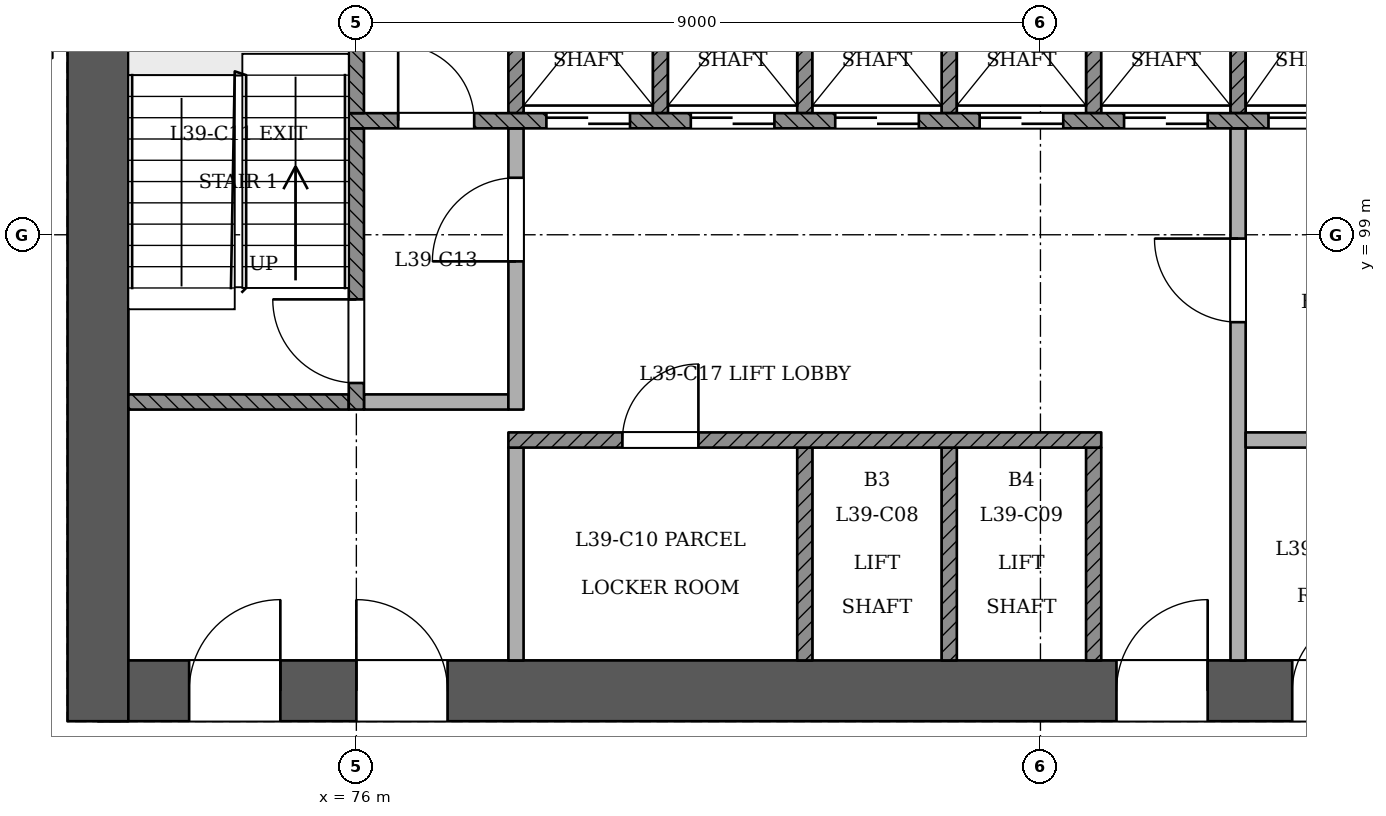
"""IFC4 building model, lengths in metres.
Left out: names, types, materials, properties, quantities, classifications, styles, units other than length and angle.
Written with IfcOpenShell. Run it as: python <this file> out.ifc"""

import sys

from ifc_helpers import new_model, si_unit, direction, frame, frame_2d, origin, place, context, subcontext, project, spatial, rectangle, extrude, element, fill, save


model = new_model("IFC4")
c1 = context("Model", 3, precision=1e-05, world=origin(), true_north=direction((0.0, 1.0)))
c2 = subcontext(c1, "Body", "Model", "MODEL_VIEW")
j1 = project(units=[si_unit("LENGTHUNIT", "METRE"), si_unit("PLANEANGLEUNIT", "RADIAN")], contexts=[c1])
p1 = place(None, origin())
s1 = spatial("IfcSite", under=j1, at=p1, CompositionType="ELEMENT")
p2 = place(p1, origin())
s2 = spatial("IfcBuilding", under=s1, at=p2, CompositionType="ELEMENT")
p3 = place(p2, frame((0.0, 0.0, 153.0)))
s3 = spatial("IfcBuildingStorey", under=s2, at=p3, CompositionType="ELEMENT", Elevation=153.0)
p4 = place(p3, frame((72.6, 93.0, 0.0), z_axis=(0.0, 0.0, 1.0), x_axis=(1.0, 0.0, 0.0)))
e1 = element("IfcWall", 1, at=p4, inside=s3, PredefinedType="SHEAR", context=c2, shape_type="SweptSolid", body=[
    extrude(rectangle(XDim=25.2, YDim=0.8, at=frame_2d((12.6, 0.0))), origin(), (0.0, 0.0, 1.0), 3.6),
])
p5 = place(p4, frame((1.2, 0.0, 0.0)))
e2 = element("IfcOpeningElement", 2, at=p5, cuts=e1, PredefinedType="OPENING", context=c2, shape_type="SweptSolid", body=[
    extrude(rectangle(XDim=1.2, YDim=2.1, at=frame_2d((0.6, 1.05))), frame((0.0, 0.411, 0.0), z_axis=(0.0, -1.0, 0.0), x_axis=(1.0, 0.0, 0.0)), (0.0, 0.0, 1.0), 0.821),
])
p6 = place(p4, frame((3.4, 0.0, 0.0)))
e3 = element("IfcOpeningElement", 3, at=p6, cuts=e1, PredefinedType="OPENING", context=c2, shape_type="SweptSolid", body=[
    extrude(rectangle(XDim=1.2, YDim=2.1, at=frame_2d((0.6, 1.05))), frame((0.0, 0.411, 0.0), z_axis=(0.0, -1.0, 0.0), x_axis=(1.0, 0.0, 0.0)), (0.0, 0.0, 1.0), 0.821),
])
p7 = place(p4, frame((13.4, 0.0, 0.0)))
e4 = element("IfcOpeningElement", 4, at=p7, cuts=e1, PredefinedType="OPENING", context=c2, shape_type="SweptSolid", body=[
    extrude(rectangle(XDim=1.2, YDim=2.1, at=frame_2d((0.6, 1.05))), frame((0.0, 0.411, 0.0), z_axis=(0.0, -1.0, 0.0), x_axis=(1.0, 0.0, 0.0)), (0.0, 0.0, 1.0), 0.821),
])
p8 = place(p4, frame((15.712, 0.0, 0.0)))
e5 = element("IfcOpeningElement", 5, at=p8, cuts=e1, PredefinedType="OPENING", context=c2, shape_type="SweptSolid", body=[
    extrude(rectangle(XDim=1.0, YDim=2.1, at=frame_2d((0.5, 1.05))), frame((0.0, 0.411, 0.0), z_axis=(0.0, -1.0, 0.0), x_axis=(1.0, 0.0, 0.0)), (0.0, 0.0, 1.0), 0.821),
])
p9 = place(p4, frame((19.15, 0.0, 0.0)))
e6 = element("IfcOpeningElement", 6, at=p9, cuts=e1, PredefinedType="OPENING", context=c2, shape_type="SweptSolid", body=[
    extrude(rectangle(XDim=1.0, YDim=2.1, at=frame_2d((0.5, 1.05))), frame((0.0, 0.411, 0.0), z_axis=(0.0, -1.0, 0.0), x_axis=(1.0, 0.0, 0.0)), (0.0, 0.0, 1.0), 0.821),
])
p10 = place(p4, frame((22.688, 0.0, 0.0)))
e7 = element("IfcOpeningElement", 7, at=p10, cuts=e1, PredefinedType="OPENING", context=c2, shape_type="SweptSolid", body=[
    extrude(rectangle(XDim=1.0, YDim=2.1, at=frame_2d((0.5, 1.05))), frame((0.0, 0.411, 0.0), z_axis=(0.0, -1.0, 0.0), x_axis=(1.0, 0.0, 0.0)), (0.0, 0.0, 1.0), 0.821),
])
p11 = place(p3, frame((72.6, 103.8, 0.0), z_axis=(0.0, 0.0, 1.0), x_axis=(0.0, -1.0, 0.0)))
e8 = element("IfcWall", 8, at=p11, inside=s3, PredefinedType="SHEAR", context=c2, shape_type="SweptSolid", body=[
    extrude(rectangle(XDim=11.2, YDim=0.8, at=frame_2d((5.6, 0.0))), origin(), (0.0, 0.0, 1.0), 3.6),
])
p12 = place(p3, frame((66.242, 97.188, 0.0), z_axis=(0.0, 0.0, 1.0), x_axis=(0.500002614046, -0.866023894559, 0.0)))
e9 = element("IfcWall", 9, at=p12, inside=s3, PredefinedType="PARTITIONING", context=c2, shape_type="SweptSolid", body=[
    extrude(rectangle(XDim=37.515, YDim=0.15, at=frame_2d((18.758, 0.0))), origin(), (0.0, 0.0, 1.0), 2.75),
])
p13 = place(p12, frame((2.8, 0.0, 0.0)))
e10 = element("IfcOpeningElement", 10, at=p13, cuts=e9, PredefinedType="OPENING", context=c2, shape_type="SweptSolid", body=[
    extrude(rectangle(XDim=1.2, YDim=2.1, at=frame_2d((0.6, 1.05))), frame((0.0, 0.085, 0.0), z_axis=(0.0, -1.0, 0.0), x_axis=(1.0, 0.0, 0.0)), (0.0, 0.0, 1.0), 0.171),
])
p14 = place(p12, frame((11.8, 0.0, 0.0)))
e11 = element("IfcOpeningElement", 11, at=p14, cuts=e9, PredefinedType="OPENING", context=c2, shape_type="SweptSolid", body=[
    extrude(rectangle(XDim=1.2, YDim=2.1, at=frame_2d((0.6, 1.05))), frame((0.0, 0.085, 0.0), z_axis=(0.0, -1.0, 0.0), x_axis=(1.0, 0.0, 0.0)), (0.0, 0.0, 1.0), 0.171),
])
p15 = place(p12, frame((24.15, 0.0, 0.0)))
e12 = element("IfcOpeningElement", 12, at=p15, cuts=e9, PredefinedType="OPENING", context=c2, shape_type="SweptSolid", body=[
    extrude(rectangle(XDim=1.2, YDim=2.1, at=frame_2d((0.6, 1.05))), frame((0.0, 0.085, 0.0), z_axis=(0.0, -1.0, 0.0), x_axis=(1.0, 0.0, 0.0)), (0.0, 0.0, 1.0), 0.171),
])
p16 = place(p12, frame((33.25, 0.0, 0.0)))
e13 = element("IfcOpeningElement", 13, at=p16, cuts=e9, PredefinedType="OPENING", context=c2, shape_type="SweptSolid", body=[
    extrude(rectangle(XDim=1.0, YDim=2.1, at=frame_2d((0.5, 1.05))), frame((0.0, 0.085, 0.0), z_axis=(0.0, -1.0, 0.0), x_axis=(1.0, 0.0, 0.0)), (0.0, 0.0, 1.0), 0.171),
])
p17 = place(p3, frame((85.065, 64.811, 0.0), z_axis=(0.0, 0.0, 1.0), x_axis=(0.500003399299, 0.866023441189, 0.0)))
e14 = element("IfcWall", 14, at=p17, inside=s3, PredefinedType="PARTITIONING", context=c2, shape_type="SweptSolid", body=[
    extrude(rectangle(XDim=37.385, YDim=0.15, at=frame_2d((18.693, 0.0))), origin(), (0.0, 0.0, 1.0), 2.75),
])
p18 = place(p17, frame((0.524, 0.0, 0.0)))
e15 = element("IfcOpeningElement", 15, at=p18, cuts=e14, PredefinedType="OPENING", context=c2, shape_type="SweptSolid", body=[
    extrude(rectangle(XDim=1.2, YDim=2.1, at=frame_2d((0.6, 1.05))), frame((0.0, 0.085, 0.0), z_axis=(0.0, -1.0, 0.0), x_axis=(1.0, 0.0, 0.0)), (0.0, 0.0, 1.0), 0.171),
])
p19 = place(p17, frame((12.036, 0.0, 0.0)))
e16 = element("IfcOpeningElement", 16, at=p19, cuts=e14, PredefinedType="OPENING", context=c2, shape_type="SweptSolid", body=[
    extrude(rectangle(XDim=1.2, YDim=2.1, at=frame_2d((0.6, 1.05))), frame((0.0, 0.085, 0.0), z_axis=(0.0, -1.0, 0.0), x_axis=(1.0, 0.0, 0.0)), (0.0, 0.0, 1.0), 0.171),
])
p20 = place(p17, frame((22.186, 0.0, 0.0)))
e17 = element("IfcOpeningElement", 17, at=p20, cuts=e14, PredefinedType="OPENING", context=c2, shape_type="SweptSolid", body=[
    extrude(rectangle(XDim=1.2, YDim=2.1, at=frame_2d((0.6, 1.05))), frame((0.0, 0.085, 0.0), z_axis=(0.0, -1.0, 0.0), x_axis=(1.0, 0.0, 0.0)), (0.0, 0.0, 1.0), 0.171),
])
p21 = place(p17, frame((31.186, 0.0, 0.0)))
e18 = element("IfcOpeningElement", 18, at=p21, cuts=e14, PredefinedType="OPENING", context=c2, shape_type="SweptSolid", body=[
    extrude(rectangle(XDim=1.2, YDim=2.1, at=frame_2d((0.6, 1.05))), frame((0.0, 0.085, 0.0), z_axis=(0.0, -1.0, 0.0), x_axis=(1.0, 0.0, 0.0)), (0.0, 0.0, 1.0), 0.171),
])
p22 = place(p3, frame((78.1, 93.4, 0.0), z_axis=(0.0, 0.0, 1.0), x_axis=(0.0, 1.0, 0.0)))
e19 = element("IfcWall", 19, at=p22, inside=s3, PredefinedType="PARTITIONING", context=c2, shape_type="SweptSolid", body=[
    extrude(rectangle(XDim=2.8, YDim=0.2, at=frame_2d((1.4, 0.0))), origin(), (0.0, 0.0, 1.0), 3.15),
])
for number, where, z_axis, x_axis in (
    (20, (81.9, 93.4, 0.0), (0.0, 0.0, 1.0), (0.0, 1.0, 0.0)),
    (21, (83.8, 93.4, 0.0), (0.0, 0.0, 1.0), (0.0, 1.0, 0.0)),
    (22, (85.7, 93.4, 0.0), (0.0, 0.0, 1.0), (0.0, 1.0, 0.0)),
):
    element("IfcWall", number, at=place(p3, frame(where, z_axis=z_axis, x_axis=x_axis)), inside=s3, PredefinedType="SOLIDWALL", context=c2, shape_type="SweptSolid", body=[
        extrude(rectangle(XDim=2.8, YDim=0.2, at=frame_2d((1.4, 0.0))), origin(), (0.0, 0.0, 1.0), 3.15),
    ])
p23 = place(p3, frame((87.6, 93.4, 0.0), z_axis=(0.0, 0.0, 1.0), x_axis=(0.0, 1.0, 0.0)))
e23 = element("IfcWall", 23, at=p23, inside=s3, PredefinedType="PARTITIONING", context=c2, shape_type="SweptSolid", body=[
    extrude(rectangle(XDim=7.0, YDim=0.2, at=frame_2d((3.5, 0.0))), origin(), (0.0, 0.0, 1.0), 3.15),
])
p24 = place(p23, frame((4.45, 0.0, 0.0)))
e24 = element("IfcOpeningElement", 24, at=p24, cuts=e23, PredefinedType="OPENING", context=c2, shape_type="SweptSolid", body=[
    extrude(rectangle(XDim=1.1, YDim=2.1, at=frame_2d((0.55, 1.05))), frame((0.0, 0.11, 0.0), z_axis=(0.0, -1.0, 0.0), x_axis=(1.0, 0.0, 0.0)), (0.0, 0.0, 1.0), 0.221),
])
p25 = place(p3, frame((78.0, 96.3, 0.0), z_axis=(0.0, 0.0, 1.0), x_axis=(1.0, 0.0, 0.0)))
e25 = element("IfcWall", 25, at=p25, inside=s3, PredefinedType="SOLIDWALL", context=c2, shape_type="SweptSolid", body=[
    extrude(rectangle(XDim=7.8, YDim=0.2, at=frame_2d((3.9, 0.0))), origin(), (0.0, 0.0, 1.0), 3.15),
])
p26 = place(p25, frame((1.5, 0.0, 0.0)))
e26 = element("IfcOpeningElement", 26, at=p26, cuts=e25, PredefinedType="OPENING", context=c2, shape_type="SweptSolid", body=[
    extrude(rectangle(XDim=1.0, YDim=2.1, at=frame_2d((0.5, 1.05))), frame((0.0, 0.11, 0.0), z_axis=(0.0, -1.0, 0.0), x_axis=(1.0, 0.0, 0.0)), (0.0, 0.0, 1.0), 0.221),
])
p27 = place(p3, frame((87.7, 96.3, 0.0), z_axis=(0.0, 0.0, 1.0), x_axis=(1.0, 0.0, 0.0)))
e27 = element("IfcWall", 27, at=p27, inside=s3, PredefinedType="PARTITIONING", context=c2, shape_type="SweptSolid", body=[
    extrude(rectangle(XDim=3.6, YDim=0.2, at=frame_2d((1.8, 0.0))), origin(), (0.0, 0.0, 1.0), 3.15),
])
p28 = place(p3, frame((73.0, 96.8, 0.0), z_axis=(0.0, 0.0, 1.0), x_axis=(1.0, 0.0, 0.0)))
e28 = element("IfcWall", 28, at=p28, inside=s3, PredefinedType="SOLIDWALL", context=c2, shape_type="SweptSolid", body=[
    extrude(rectangle(XDim=2.9, YDim=0.2, at=frame_2d((1.45, 0.0))), origin(), (0.0, 0.0, 1.0), 3.15),
])
p29 = place(p3, frame((76.0, 96.7, 0.0), z_axis=(0.0, 0.0, 1.0), x_axis=(0.0, 1.0, 0.0)))
e29 = element("IfcWall", 29, at=p29, inside=s3, PredefinedType="SOLIDWALL", context=c2, shape_type="SweptSolid", body=[
    extrude(rectangle(XDim=3.7, YDim=0.2, at=frame_2d((1.85, 0.0))), origin(), (0.0, 0.0, 1.0), 3.15),
])
p30 = place(p29, frame((0.35, 0.0, 0.0)))
e30 = element("IfcOpeningElement", 30, at=p30, cuts=e29, PredefinedType="OPENING", context=c2, shape_type="SweptSolid", body=[
    extrude(rectangle(XDim=1.1, YDim=2.1, at=frame_2d((0.55, 1.05))), frame((0.0, 0.11, 0.0), z_axis=(0.0, -1.0, 0.0), x_axis=(1.0, 0.0, 0.0)), (0.0, 0.0, 1.0), 0.221),
])
p31 = place(p3, frame((76.1, 96.8, 0.0), z_axis=(0.0, 0.0, 1.0), x_axis=(1.0, 0.0, 0.0)))
e31 = element("IfcWall", 31, at=p31, inside=s3, PredefinedType="PARTITIONING", context=c2, shape_type="SweptSolid", body=[
    extrude(rectangle(XDim=1.9, YDim=0.2, at=frame_2d((0.95, 0.0))), origin(), (0.0, 0.0, 1.0), 3.15),
])
p32 = place(p3, frame((78.1, 96.7, 0.0), z_axis=(0.0, 0.0, 1.0), x_axis=(0.0, 1.0, 0.0)))
e32 = element("IfcWall", 32, at=p32, inside=s3, PredefinedType="PARTITIONING", context=c2, shape_type="SweptSolid", body=[
    extrude(rectangle(XDim=3.7, YDim=0.2, at=frame_2d((1.85, 0.0))), origin(), (0.0, 0.0, 1.0), 3.15),
])
p33 = place(p32, frame((1.95, 0.0, 0.0)))
e33 = element("IfcOpeningElement", 33, at=p33, cuts=e32, PredefinedType="OPENING", context=c2, shape_type="SweptSolid", body=[
    extrude(rectangle(XDim=1.1, YDim=2.1, at=frame_2d((0.55, 1.05))), frame((0.0, 0.11, 0.0), z_axis=(0.0, -1.0, 0.0), x_axis=(1.0, 0.0, 0.0)), (0.0, 0.0, 1.0), 0.221),
])
p34 = place(p3, frame((75.9, 100.5, 0.0), z_axis=(0.0, 0.0, 1.0), x_axis=(1.0, 0.0, 0.0)))
e34 = element("IfcWall", 34, at=p34, inside=s3, PredefinedType="SOLIDWALL", context=c2, shape_type="SweptSolid", body=[
    extrude(rectangle(XDim=18.2, YDim=0.2, at=frame_2d((9.1, 0.0))), origin(), (0.0, 0.0, 1.0), 3.15),
])
p35 = place(p34, frame((2.6, 0.0, 0.0)))
e35 = element("IfcOpeningElement", 35, at=p35, cuts=e34, PredefinedType="OPENING", context=c2, shape_type="SweptSolid", body=[
    extrude(rectangle(XDim=1.1, YDim=2.1, at=frame_2d((0.55, 1.05))), frame((0.0, 0.11, 0.0), z_axis=(0.0, -1.0, 0.0), x_axis=(1.0, 0.0, 0.0)), (0.0, 0.0, 1.0), 0.221),
])
p36 = place(p34, frame((4.5, 0.0, 0.0)))
e36 = element("IfcOpeningElement", 36, at=p36, cuts=e34, PredefinedType="OPENING", context=c2, shape_type="SweptSolid", body=[
    extrude(rectangle(XDim=1.1, YDim=2.1, at=frame_2d((0.55, 1.05))), frame((0.0, 0.11, 0.0), z_axis=(0.0, -1.0, 0.0), x_axis=(1.0, 0.0, 0.0)), (0.0, 0.0, 1.0), 0.221),
])
p37 = place(p34, frame((6.4, 0.0, 0.0)))
e37 = element("IfcOpeningElement", 37, at=p37, cuts=e34, PredefinedType="OPENING", context=c2, shape_type="SweptSolid", body=[
    extrude(rectangle(XDim=1.1, YDim=2.1, at=frame_2d((0.55, 1.05))), frame((0.0, 0.11, 0.0), z_axis=(0.0, -1.0, 0.0), x_axis=(1.0, 0.0, 0.0)), (0.0, 0.0, 1.0), 0.221),
])
p38 = place(p34, frame((8.3, 0.0, 0.0)))
e38 = element("IfcOpeningElement", 38, at=p38, cuts=e34, PredefinedType="OPENING", context=c2, shape_type="SweptSolid", body=[
    extrude(rectangle(XDim=1.1, YDim=2.1, at=frame_2d((0.55, 1.05))), frame((0.0, 0.11, 0.0), z_axis=(0.0, -1.0, 0.0), x_axis=(1.0, 0.0, 0.0)), (0.0, 0.0, 1.0), 0.221),
])
p39 = place(p34, frame((10.2, 0.0, 0.0)))
e39 = element("IfcOpeningElement", 39, at=p39, cuts=e34, PredefinedType="OPENING", context=c2, shape_type="SweptSolid", body=[
    extrude(rectangle(XDim=1.1, YDim=2.1, at=frame_2d((0.55, 1.05))), frame((0.0, 0.11, 0.0), z_axis=(0.0, -1.0, 0.0), x_axis=(1.0, 0.0, 0.0)), (0.0, 0.0, 1.0), 0.221),
])
p40 = place(p34, frame((12.1, 0.0, 0.0)))
e40 = element("IfcOpeningElement", 40, at=p40, cuts=e34, PredefinedType="OPENING", context=c2, shape_type="SweptSolid", body=[
    extrude(rectangle(XDim=1.1, YDim=2.1, at=frame_2d((0.55, 1.05))), frame((0.0, 0.11, 0.0), z_axis=(0.0, -1.0, 0.0), x_axis=(1.0, 0.0, 0.0)), (0.0, 0.0, 1.0), 0.221),
])
p41 = place(p34, frame((14.0, 0.0, 0.0)))
e41 = element("IfcOpeningElement", 41, at=p41, cuts=e34, PredefinedType="OPENING", context=c2, shape_type="SweptSolid", body=[
    extrude(rectangle(XDim=1.1, YDim=2.1, at=frame_2d((0.55, 1.05))), frame((0.0, 0.11, 0.0), z_axis=(0.0, -1.0, 0.0), x_axis=(1.0, 0.0, 0.0)), (0.0, 0.0, 1.0), 0.221),
])
p42 = place(p34, frame((0.65, 0.0, 0.0)))
e42 = element("IfcOpeningElement", 42, at=p42, cuts=e34, PredefinedType="OPENING", context=c2, shape_type="SweptSolid", body=[
    extrude(rectangle(XDim=1.0, YDim=2.1, at=frame_2d((0.5, 1.05))), frame((0.0, 0.11, 0.0), z_axis=(0.0, -1.0, 0.0), x_axis=(1.0, 0.0, 0.0)), (0.0, 0.0, 1.0), 0.221),
])
p43 = place(p34, frame((16.3, 0.0, 0.0)))
e43 = element("IfcOpeningElement", 43, at=p43, cuts=e34, PredefinedType="OPENING", context=c2, shape_type="SweptSolid", body=[
    extrude(rectangle(XDim=1.0, YDim=2.1, at=frame_2d((0.5, 1.05))), frame((0.0, 0.11, 0.0), z_axis=(0.0, -1.0, 0.0), x_axis=(1.0, 0.0, 0.0)), (0.0, 0.0, 1.0), 0.221),
])
for number, where, z_axis, x_axis in (
    (44, (76.0, 100.6, 0.0), (0.0, 0.0, 1.0), (0.0, 1.0, 0.0)),
    (45, (78.1, 100.6, 0.0), (0.0, 0.0, 1.0), (0.0, 1.0, 0.0)),
    (46, (80.0, 100.6, 0.0), (0.0, 0.0, 1.0), (0.0, 1.0, 0.0)),
    (47, (81.9, 100.6, 0.0), (0.0, 0.0, 1.0), (0.0, 1.0, 0.0)),
    (48, (83.8, 100.6, 0.0), (0.0, 0.0, 1.0), (0.0, 1.0, 0.0)),
    (49, (85.7, 100.6, 0.0), (0.0, 0.0, 1.0), (0.0, 1.0, 0.0)),
    (50, (87.6, 100.6, 0.0), (0.0, 0.0, 1.0), (0.0, 1.0, 0.0)),
):
    element("IfcWall", number, at=place(p3, frame(where, z_axis=z_axis, x_axis=x_axis)), inside=s3, PredefinedType="SOLIDWALL", context=c2, shape_type="SweptSolid", body=[
        extrude(rectangle(XDim=2.8, YDim=0.2, at=frame_2d((1.4, 0.0))), origin(), (0.0, 0.0, 1.0), 3.15),
    ])
p44 = place(p35, origin())
e51 = element("IfcDoor", 51, at=p44, inside=s3, OperationType="SLIDING_TO_RIGHT", PredefinedType="NOTDEFINED", context=c2, shape_type="SweptSolid", body=[
    extrude(rectangle(XDim=1.1, YDim=2.1, at=frame_2d((0.55, 1.05))), frame((0.0, 0.025, 0.0), z_axis=(0.0, -1.0, 0.0), x_axis=(1.0, 0.0, 0.0)), (0.0, 0.0, 1.0), 0.05),
])
fill(e35, e51)
p45 = place(p36, origin())
e52 = element("IfcDoor", 52, at=p45, inside=s3, OperationType="SLIDING_TO_LEFT", PredefinedType="NOTDEFINED", context=c2, shape_type="SweptSolid", body=[
    extrude(rectangle(XDim=1.1, YDim=2.1, at=frame_2d((0.55, 1.05))), frame((0.0, 0.025, 0.0), z_axis=(0.0, -1.0, 0.0), x_axis=(1.0, 0.0, 0.0)), (0.0, 0.0, 1.0), 0.05),
])
fill(e36, e52)
p46 = place(p37, origin())
e53 = element("IfcDoor", 53, at=p46, inside=s3, OperationType="SLIDING_TO_RIGHT", PredefinedType="NOTDEFINED", context=c2, shape_type="SweptSolid", body=[
    extrude(rectangle(XDim=1.1, YDim=2.1, at=frame_2d((0.55, 1.05))), frame((0.0, 0.025, 0.0), z_axis=(0.0, -1.0, 0.0), x_axis=(1.0, 0.0, 0.0)), (0.0, 0.0, 1.0), 0.05),
])
fill(e37, e53)
p47 = place(p38, origin())
e54 = element("IfcDoor", 54, at=p47, inside=s3, OperationType="SLIDING_TO_LEFT", PredefinedType="NOTDEFINED", context=c2, shape_type="SweptSolid", body=[
    extrude(rectangle(XDim=1.1, YDim=2.1, at=frame_2d((0.55, 1.05))), frame((0.0, 0.025, 0.0), z_axis=(0.0, -1.0, 0.0), x_axis=(1.0, 0.0, 0.0)), (0.0, 0.0, 1.0), 0.05),
])
fill(e38, e54)
p48 = place(p39, origin())
e55 = element("IfcDoor", 55, at=p48, inside=s3, OperationType="SLIDING_TO_RIGHT", PredefinedType="NOTDEFINED", context=c2, shape_type="SweptSolid", body=[
    extrude(rectangle(XDim=1.1, YDim=2.1, at=frame_2d((0.55, 1.05))), frame((0.0, 0.025, 0.0), z_axis=(0.0, -1.0, 0.0), x_axis=(1.0, 0.0, 0.0)), (0.0, 0.0, 1.0), 0.05),
])
fill(e39, e55)
p49 = place(p40, origin())
e56 = element("IfcDoor", 56, at=p49, inside=s3, OperationType="SLIDING_TO_RIGHT", PredefinedType="NOTDEFINED", context=c2, shape_type="SweptSolid", body=[
    extrude(rectangle(XDim=1.1, YDim=2.1, at=frame_2d((0.55, 1.05))), frame((0.0, 0.025, 0.0), z_axis=(0.0, -1.0, 0.0), x_axis=(1.0, 0.0, 0.0)), (0.0, 0.0, 1.0), 0.05),
])
fill(e40, e56)
p50 = place(p30, origin())
e57 = element("IfcDoor", 57, at=p50, inside=s3, OperationType="SINGLE_SWING_RIGHT", PredefinedType="NOTDEFINED", context=c2, shape_type="SweptSolid", body=[
    extrude(rectangle(XDim=1.1, YDim=2.1, at=frame_2d((0.55, 1.05))), frame((0.0, 0.025, 0.0), z_axis=(0.0, -1.0, 0.0), x_axis=(1.0, 0.0, 0.0)), (0.0, 0.0, 1.0), 0.05),
])
fill(e30, e57)
p51 = place(p33, origin())
e58 = element("IfcDoor", 58, at=p51, inside=s3, OperationType="SINGLE_SWING_LEFT", PredefinedType="NOTDEFINED", context=c2, shape_type="SweptSolid", body=[
    extrude(rectangle(XDim=1.1, YDim=2.1, at=frame_2d((0.55, 1.05))), frame((0.0, 0.025, 0.0), z_axis=(0.0, -1.0, 0.0), x_axis=(1.0, 0.0, 0.0)), (0.0, 0.0, 1.0), 0.05),
])
fill(e33, e58)
p52 = place(p24, origin())
e59 = element("IfcDoor", 59, at=p52, inside=s3, OperationType="SINGLE_SWING_RIGHT", PredefinedType="NOTDEFINED", context=c2, shape_type="SweptSolid", body=[
    extrude(rectangle(XDim=1.1, YDim=2.1, at=frame_2d((0.55, 1.05))), frame((0.0, 0.025, 0.0), z_axis=(0.0, -1.0, 0.0), x_axis=(1.0, 0.0, 0.0)), (0.0, 0.0, 1.0), 0.05),
])
fill(e24, e59)
p53 = place(p5, origin())
e60 = element("IfcDoor", 60, at=p53, inside=s3, OperationType="SINGLE_SWING_RIGHT", PredefinedType="NOTDEFINED", context=c2, shape_type="SweptSolid", body=[
    extrude(rectangle(XDim=1.2, YDim=2.1, at=frame_2d((0.6, 1.05))), frame((0.0, 0.025, 0.0), z_axis=(0.0, -1.0, 0.0), x_axis=(1.0, 0.0, 0.0)), (0.0, 0.0, 1.0), 0.05),
])
fill(e2, e60)
p54 = place(p6, origin())
e61 = element("IfcDoor", 61, at=p54, inside=s3, OperationType="SINGLE_SWING_LEFT", PredefinedType="NOTDEFINED", context=c2, shape_type="SweptSolid", body=[
    extrude(rectangle(XDim=1.2, YDim=2.1, at=frame_2d((0.6, 1.05))), frame((0.0, 0.025, 0.0), z_axis=(0.0, -1.0, 0.0), x_axis=(1.0, 0.0, 0.0)), (0.0, 0.0, 1.0), 0.05),
])
fill(e3, e61)
p55 = place(p7, origin())
e62 = element("IfcDoor", 62, at=p55, inside=s3, OperationType="SINGLE_SWING_RIGHT", PredefinedType="NOTDEFINED", context=c2, shape_type="SweptSolid", body=[
    extrude(rectangle(XDim=1.2, YDim=2.1, at=frame_2d((0.6, 1.05))), frame((0.0, 0.025, 0.0), z_axis=(0.0, -1.0, 0.0), x_axis=(1.0, 0.0, 0.0)), (0.0, 0.0, 1.0), 0.05),
])
fill(e4, e62)
p56 = place(p42, origin())
e63 = element("IfcDoor", 63, at=p56, inside=s3, OperationType="SINGLE_SWING_LEFT", PredefinedType="NOTDEFINED", context=c2, shape_type="SweptSolid", body=[
    extrude(rectangle(XDim=1.0, YDim=2.1, at=frame_2d((0.5, 1.05))), frame((0.0, 0.025, 0.0), z_axis=(0.0, -1.0, 0.0), x_axis=(1.0, 0.0, 0.0)), (0.0, 0.0, 1.0), 0.05),
])
fill(e42, e63)
p57 = place(p8, origin())
e64 = element("IfcDoor", 64, at=p57, inside=s3, OperationType="SINGLE_SWING_RIGHT", PredefinedType="NOTDEFINED", context=c2, shape_type="SweptSolid", body=[
    extrude(rectangle(XDim=1.0, YDim=2.1, at=frame_2d((0.5, 1.05))), frame((0.0, 0.025, 0.0), z_axis=(0.0, -1.0, 0.0), x_axis=(1.0, 0.0, 0.0)), (0.0, 0.0, 1.0), 0.05),
])
fill(e5, e64)
p58 = place(p26, origin())
e65 = element("IfcDoor", 65, at=p58, inside=s3, OperationType="SINGLE_SWING_RIGHT", PredefinedType="NOTDEFINED", context=c2, shape_type="SweptSolid", body=[
    extrude(rectangle(XDim=1.0, YDim=2.1, at=frame_2d((0.5, 1.05))), frame((0.0, 0.025, 0.0), z_axis=(0.0, -1.0, 0.0), x_axis=(1.0, 0.0, 0.0)), (0.0, 0.0, 1.0), 0.05),
])
fill(e26, e65)
save(model, sys.argv[1])
